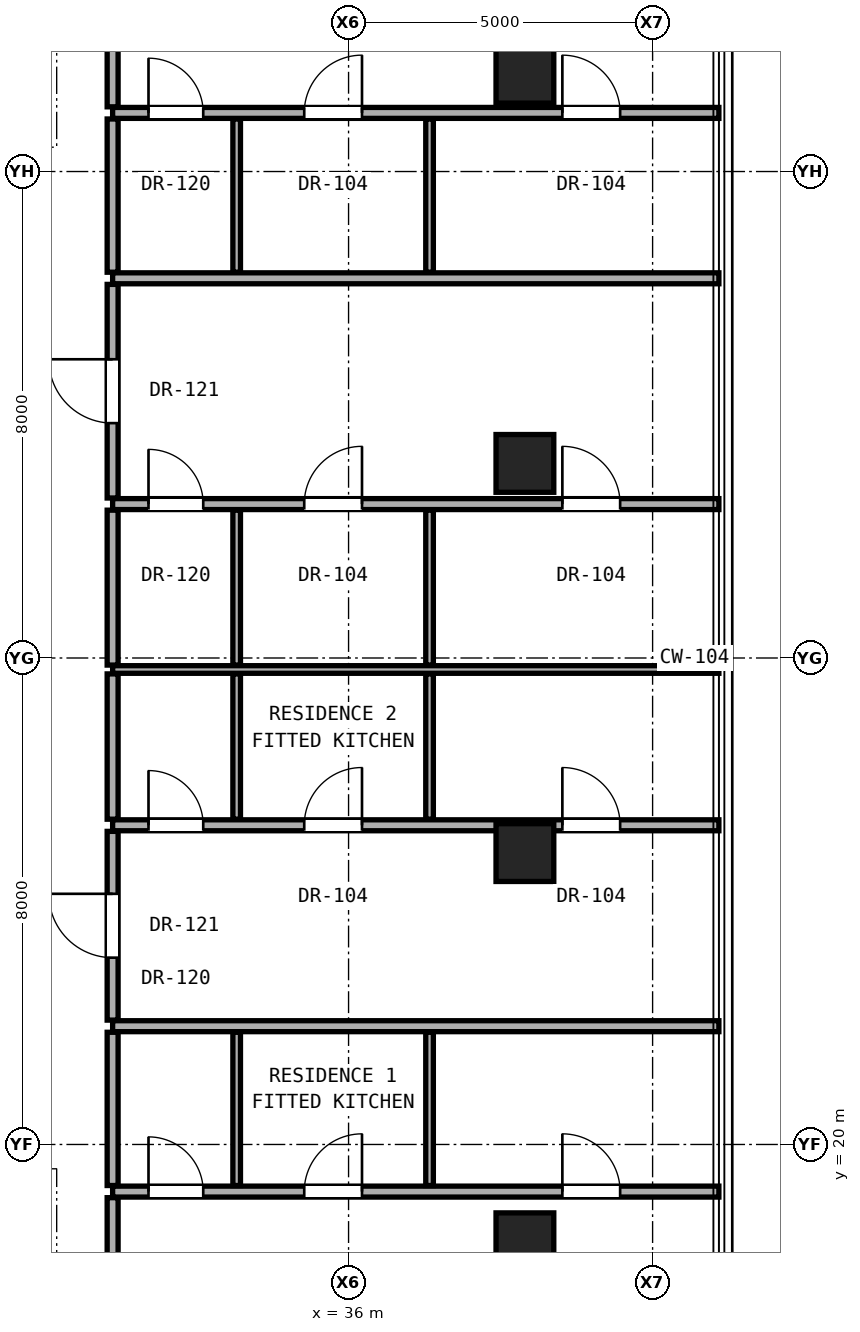
"""IFC4 building model, lengths in metres.
Left out: names, types, materials, properties, quantities, classifications, styles, units other than length and angle.
Written with IfcOpenShell. Run it as: python <this file> out.ifc"""

import sys

from ifc_helpers import new_model, si_unit, direction, frame, frame_2d, origin, origin_2d, place, context, subcontext, project, spatial, rectangle, hollow_rectangle, extrude, element, fill, save


model = new_model("IFC4")
c1 = context("Model", 3, precision=1e-05, world=origin(), true_north=direction((0.0, 1.0)))
c2 = subcontext(c1, "Body", "Model", "MODEL_VIEW")
j1 = project(units=[si_unit("LENGTHUNIT", "METRE"), si_unit("PLANEANGLEUNIT", "RADIAN")], contexts=[c1])
p1 = place(None, origin())
s1 = spatial("IfcSite", under=j1, at=p1, CompositionType="ELEMENT")
p2 = place(p1, origin())
s2 = spatial("IfcBuilding", under=s1, at=p2, CompositionType="ELEMENT")
p3 = place(p2, frame((0.0, 0.0, 177.15)))
s3 = spatial("IfcBuildingStorey", under=s2, at=p3, CompositionType="ELEMENT", Elevation=177.15)
for number, where, z_axis, x_axis in (
    (1, (38.9, 18.4, 0.0), (0.0, 0.0, 1.0), (1.0, 0.0, 0.0)),
    (2, (38.9, 24.8, 0.0), (0.0, 0.0, 1.0), (1.0, 0.0, 0.0)),
    (3, (38.9, 31.2, 0.0), (0.0, 0.0, 1.0), (1.0, 0.0, 0.0)),
    (4, (38.9, 37.6, 0.0), (0.0, 0.0, 1.0), (1.0, 0.0, 0.0)),
):
    element("IfcColumn", number, at=place(p3, frame(where, z_axis=z_axis, x_axis=x_axis)), inside=s3, PredefinedType="COLUMN", context=c2, shape_type="SweptSolid", body=[
        extrude(hollow_rectangle(XDim=0.95, YDim=0.95, WallThickness=0.05, at=origin_2d()), origin(), (0.0, 0.0, 1.0), 3.25),
    ])
p4 = place(p3, frame((32.12, 19.225, 0.0), z_axis=(0.0, 0.0, 1.0), x_axis=(1.0, 0.0, 0.0)))
e5 = element("IfcWall", 5, at=p4, inside=s3, PredefinedType="PARTITIONING", context=c2, shape_type="SweptSolid", body=[
    extrude(rectangle(XDim=9.97, YDim=0.18, at=frame_2d((4.985, 0.0))), origin(), (0.0, 0.0, 1.0), 2.269),
])
p5 = place(p4, frame((7.396, 0.0, 0.0)))
e6 = element("IfcOpeningElement", 6, at=p5, cuts=e5, PredefinedType="OPENING", context=c2, shape_type="SweptSolid", body=[
    extrude(rectangle(XDim=0.95, YDim=2.15, at=frame_2d((0.475, 1.075))), frame((0.0, 0.1, 0.0), z_axis=(0.0, -1.0, 0.0), x_axis=(1.0, 0.0, 0.0)), (0.0, 0.0, 1.0), 0.2),
])
p6 = place(p4, frame((3.151, 0.0, 0.0)))
e7 = element("IfcOpeningElement", 7, at=p6, cuts=e5, PredefinedType="OPENING", context=c2, shape_type="SweptSolid", body=[
    extrude(rectangle(XDim=0.95, YDim=2.15, at=frame_2d((0.475, 1.075))), frame((0.0, 0.1, 0.0), z_axis=(0.0, -1.0, 0.0), x_axis=(1.0, 0.0, 0.0)), (0.0, 0.0, 1.0), 0.2),
])
p7 = place(p4, frame((0.59, 0.0, 0.0)))
e8 = element("IfcOpeningElement", 8, at=p7, cuts=e5, PredefinedType="OPENING", context=c2, shape_type="SweptSolid", body=[
    extrude(rectangle(XDim=0.9, YDim=2.1, at=frame_2d((0.45, 1.05))), frame((0.0, 0.1, 0.0), z_axis=(0.0, -1.0, 0.0), x_axis=(1.0, 0.0, 0.0)), (0.0, 0.0, 1.0), 0.2),
])
p8 = place(p3, frame((32.12, 21.945, 0.0), z_axis=(0.0, 0.0, 1.0), x_axis=(1.0, 0.0, 0.0)))
e9 = element("IfcWall", 9, at=p8, inside=s3, PredefinedType="PARTITIONING", context=c2, shape_type="SweptSolid", body=[
    extrude(rectangle(XDim=9.97, YDim=0.18, at=frame_2d((4.985, 0.0))), origin(), (0.0, 0.0, 1.0), 2.269),
])
p9 = place(p3, frame((32.12, 25.249, 0.0), z_axis=(0.0, 0.0, 1.0), x_axis=(1.0, 0.0, 0.0)))
e10 = element("IfcWall", 10, at=p9, inside=s3, PredefinedType="PARTITIONING", context=c2, shape_type="SweptSolid", body=[
    extrude(rectangle(XDim=9.97, YDim=0.18, at=frame_2d((4.985, 0.0))), origin(), (0.0, 0.0, 1.0), 2.269),
])
p10 = place(p9, frame((7.396, 0.0, 0.0)))
e11 = element("IfcOpeningElement", 11, at=p10, cuts=e10, PredefinedType="OPENING", context=c2, shape_type="SweptSolid", body=[
    extrude(rectangle(XDim=0.95, YDim=2.15, at=frame_2d((0.475, 1.075))), frame((0.0, 0.1, 0.0), z_axis=(0.0, -1.0, 0.0), x_axis=(1.0, 0.0, 0.0)), (0.0, 0.0, 1.0), 0.2),
])
p11 = place(p9, frame((3.151, 0.0, 0.0)))
e12 = element("IfcOpeningElement", 12, at=p11, cuts=e10, PredefinedType="OPENING", context=c2, shape_type="SweptSolid", body=[
    extrude(rectangle(XDim=0.95, YDim=2.15, at=frame_2d((0.475, 1.075))), frame((0.0, 0.1, 0.0), z_axis=(0.0, -1.0, 0.0), x_axis=(1.0, 0.0, 0.0)), (0.0, 0.0, 1.0), 0.2),
])
p12 = place(p9, frame((0.59, 0.0, 0.0)))
e13 = element("IfcOpeningElement", 13, at=p12, cuts=e10, PredefinedType="OPENING", context=c2, shape_type="SweptSolid", body=[
    extrude(rectangle(XDim=0.9, YDim=2.1, at=frame_2d((0.45, 1.05))), frame((0.0, 0.1, 0.0), z_axis=(0.0, -1.0, 0.0), x_axis=(1.0, 0.0, 0.0)), (0.0, 0.0, 1.0), 0.2),
])
p13 = place(p3, frame((32.12, 27.811, 0.0), z_axis=(0.0, 0.0, 1.0), x_axis=(1.0, 0.0, 0.0)))
e14 = element("IfcWall", 14, at=p13, inside=s3, PredefinedType="PARTITIONING", context=c2, shape_type="SweptSolid", body=[
    extrude(rectangle(XDim=9.97, YDim=0.125, at=frame_2d((4.985, 0.0))), origin(), (0.0, 0.0, 1.0), 2.269),
])
p14 = place(p3, frame((32.12, 30.531, 0.0), z_axis=(0.0, 0.0, 1.0), x_axis=(1.0, 0.0, 0.0)))
e15 = element("IfcWall", 15, at=p14, inside=s3, PredefinedType="PARTITIONING", context=c2, shape_type="SweptSolid", body=[
    extrude(rectangle(XDim=9.97, YDim=0.18, at=frame_2d((4.985, 0.0))), origin(), (0.0, 0.0, 1.0), 2.269),
])
p15 = place(p14, frame((7.396, 0.0, 0.0)))
e16 = element("IfcOpeningElement", 16, at=p15, cuts=e15, PredefinedType="OPENING", context=c2, shape_type="SweptSolid", body=[
    extrude(rectangle(XDim=0.95, YDim=2.15, at=frame_2d((0.475, 1.075))), frame((0.0, 0.1, 0.0), z_axis=(0.0, -1.0, 0.0), x_axis=(1.0, 0.0, 0.0)), (0.0, 0.0, 1.0), 0.2),
])
p16 = place(p14, frame((3.151, 0.0, 0.0)))
e17 = element("IfcOpeningElement", 17, at=p16, cuts=e15, PredefinedType="OPENING", context=c2, shape_type="SweptSolid", body=[
    extrude(rectangle(XDim=0.95, YDim=2.15, at=frame_2d((0.475, 1.075))), frame((0.0, 0.1, 0.0), z_axis=(0.0, -1.0, 0.0), x_axis=(1.0, 0.0, 0.0)), (0.0, 0.0, 1.0), 0.2),
])
p17 = place(p14, frame((0.59, 0.0, 0.0)))
e18 = element("IfcOpeningElement", 18, at=p17, cuts=e15, PredefinedType="OPENING", context=c2, shape_type="SweptSolid", body=[
    extrude(rectangle(XDim=0.9, YDim=2.1, at=frame_2d((0.45, 1.05))), frame((0.0, 0.1, 0.0), z_axis=(0.0, -1.0, 0.0), x_axis=(1.0, 0.0, 0.0)), (0.0, 0.0, 1.0), 0.2),
])
p18 = place(p3, frame((32.12, 34.244, 0.0), z_axis=(0.0, 0.0, 1.0), x_axis=(1.0, 0.0, 0.0)))
e19 = element("IfcWall", 19, at=p18, inside=s3, PredefinedType="PARTITIONING", context=c2, shape_type="SweptSolid", body=[
    extrude(rectangle(XDim=9.97, YDim=0.18, at=frame_2d((4.985, 0.0))), origin(), (0.0, 0.0, 1.0), 2.269),
])
p19 = place(p3, frame((32.12, 36.964, 0.0), z_axis=(0.0, 0.0, 1.0), x_axis=(1.0, 0.0, 0.0)))
e20 = element("IfcWall", 20, at=p19, inside=s3, PredefinedType="PARTITIONING", context=c2, shape_type="SweptSolid", body=[
    extrude(rectangle(XDim=9.97, YDim=0.18, at=frame_2d((4.985, 0.0))), origin(), (0.0, 0.0, 1.0), 2.269),
])
p20 = place(p19, frame((7.396, 0.0, 0.0)))
e21 = element("IfcOpeningElement", 21, at=p20, cuts=e20, PredefinedType="OPENING", context=c2, shape_type="SweptSolid", body=[
    extrude(rectangle(XDim=0.95, YDim=2.15, at=frame_2d((0.475, 1.075))), frame((0.0, 0.1, 0.0), z_axis=(0.0, -1.0, 0.0), x_axis=(1.0, 0.0, 0.0)), (0.0, 0.0, 1.0), 0.2),
])
p21 = place(p19, frame((3.151, 0.0, 0.0)))
e22 = element("IfcOpeningElement", 22, at=p21, cuts=e20, PredefinedType="OPENING", context=c2, shape_type="SweptSolid", body=[
    extrude(rectangle(XDim=0.95, YDim=2.15, at=frame_2d((0.475, 1.075))), frame((0.0, 0.1, 0.0), z_axis=(0.0, -1.0, 0.0), x_axis=(1.0, 0.0, 0.0)), (0.0, 0.0, 1.0), 0.2),
])
p22 = place(p19, frame((0.59, 0.0, 0.0)))
e23 = element("IfcOpeningElement", 23, at=p22, cuts=e20, PredefinedType="OPENING", context=c2, shape_type="SweptSolid", body=[
    extrude(rectangle(XDim=0.9, YDim=2.1, at=frame_2d((0.45, 1.05))), frame((0.0, 0.1, 0.0), z_axis=(0.0, -1.0, 0.0), x_axis=(1.0, 0.0, 0.0)), (0.0, 0.0, 1.0), 0.2),
])
p23 = place(p3, frame((32.12, 14.489, 0.0), z_axis=(0.0, 0.0, 1.0), x_axis=(0.0, 1.0, 0.0)))
e24 = element("IfcWall", 24, at=p23, inside=s3, PredefinedType="PARTITIONING", context=c2, shape_type="SweptSolid", body=[
    extrude(rectangle(XDim=4.636, YDim=0.18, at=frame_2d((2.318, 0.0))), origin(), (0.0, 0.0, 1.0), 2.442),
])
p24 = place(p23, frame((2.093, 0.0, 0.0)))
e25 = element("IfcOpeningElement", 25, at=p24, cuts=e24, PredefinedType="OPENING", context=c2, shape_type="SweptSolid", body=[
    extrude(rectangle(XDim=1.05, YDim=2.2, at=frame_2d((0.525, 1.1))), frame((0.0, 0.1, 0.0), z_axis=(0.0, -1.0, 0.0), x_axis=(1.0, 0.0, 0.0)), (0.0, 0.0, 1.0), 0.2),
])
p25 = place(p3, frame((32.12, 19.325, 0.0), z_axis=(0.0, 0.0, 1.0), x_axis=(0.0, 1.0, 0.0)))
e26 = element("IfcWall", 26, at=p25, inside=s3, PredefinedType="PARTITIONING", context=c2, shape_type="SweptSolid", body=[
    extrude(rectangle(XDim=2.52, YDim=0.18, at=frame_2d((1.26, 0.0))), origin(), (0.0, 0.0, 1.0), 3.05),
])
p26 = place(p3, frame((32.12, 22.045, 0.0), z_axis=(0.0, 0.0, 1.0), x_axis=(0.0, 1.0, 0.0)))
e27 = element("IfcWall", 27, at=p26, inside=s3, PredefinedType="PARTITIONING", context=c2, shape_type="SweptSolid", body=[
    extrude(rectangle(XDim=3.104, YDim=0.18, at=frame_2d((1.552, 0.0))), origin(), (0.0, 0.0, 1.0), 2.346),
])
p27 = place(p26, frame((1.027, 0.0, 0.0)))
e28 = element("IfcOpeningElement", 28, at=p27, cuts=e27, PredefinedType="OPENING", context=c2, shape_type="SweptSolid", body=[
    extrude(rectangle(XDim=1.05, YDim=2.2, at=frame_2d((0.525, 1.1))), frame((0.0, 0.1, 0.0), z_axis=(0.0, -1.0, 0.0), x_axis=(1.0, 0.0, 0.0)), (0.0, 0.0, 1.0), 0.2),
])
p28 = place(p3, frame((32.12, 25.349, 0.0), z_axis=(0.0, 0.0, 1.0), x_axis=(0.0, 1.0, 0.0)))
e29 = element("IfcWall", 29, at=p28, inside=s3, PredefinedType="PARTITIONING", context=c2, shape_type="SweptSolid", body=[
    extrude(rectangle(XDim=2.389, YDim=0.18, at=frame_2d((1.195, 0.0))), origin(), (0.0, 0.0, 1.0), 3.05),
])
p29 = place(p3, frame((32.12, 27.884, 0.0), z_axis=(0.0, 0.0, 1.0), x_axis=(0.0, 1.0, 0.0)))
e30 = element("IfcWall", 30, at=p29, inside=s3, PredefinedType="PARTITIONING", context=c2, shape_type="SweptSolid", body=[
    extrude(rectangle(XDim=2.547, YDim=0.18, at=frame_2d((1.274, 0.0))), origin(), (0.0, 0.0, 1.0), 3.05),
])
p30 = place(p3, frame((32.12, 30.631, 0.0), z_axis=(0.0, 0.0, 1.0), x_axis=(0.0, 1.0, 0.0)))
e31 = element("IfcWall", 31, at=p30, inside=s3, PredefinedType="PARTITIONING", context=c2, shape_type="SweptSolid", body=[
    extrude(rectangle(XDim=3.513, YDim=0.18, at=frame_2d((1.756, 0.0))), origin(), (0.0, 0.0, 1.0), 2.346),
])
p31 = place(p30, frame((1.231, 0.0, 0.0)))
e32 = element("IfcOpeningElement", 32, at=p31, cuts=e31, PredefinedType="OPENING", context=c2, shape_type="SweptSolid", body=[
    extrude(rectangle(XDim=1.05, YDim=2.2, at=frame_2d((0.525, 1.1))), frame((0.0, 0.1, 0.0), z_axis=(0.0, -1.0, 0.0), x_axis=(1.0, 0.0, 0.0)), (0.0, 0.0, 1.0), 0.2),
])
p32 = place(p3, frame((32.12, 34.344, 0.0), z_axis=(0.0, 0.0, 1.0), x_axis=(0.0, 1.0, 0.0)))
e33 = element("IfcWall", 33, at=p32, inside=s3, PredefinedType="PARTITIONING", context=c2, shape_type="SweptSolid", body=[
    extrude(rectangle(XDim=2.52, YDim=0.18, at=frame_2d((1.26, 0.0))), origin(), (0.0, 0.0, 1.0), 3.05),
])
p33 = place(p3, frame((32.12, 37.064, 0.0), z_axis=(0.0, 0.0, 1.0), x_axis=(0.0, 1.0, 0.0)))
e34 = element("IfcWall", 34, at=p33, inside=s3, PredefinedType="PARTITIONING", context=c2, shape_type="SweptSolid", body=[
    extrude(rectangle(XDim=4.447, YDim=0.18, at=frame_2d((2.224, 0.0))), origin(), (0.0, 0.0, 1.0), 2.442),
])
p34 = place(p33, frame((1.098, 0.0, 0.0)))
e35 = element("IfcOpeningElement", 35, at=p34, cuts=e34, PredefinedType="OPENING", context=c2, shape_type="SweptSolid", body=[
    extrude(rectangle(XDim=1.05, YDim=2.2, at=frame_2d((0.525, 1.1))), frame((0.0, 0.1, 0.0), z_axis=(0.0, -1.0, 0.0), x_axis=(1.0, 0.0, 0.0)), (0.0, 0.0, 1.0), 0.2),
])
p35 = place(p3, frame((34.16, 19.325, 0.0), z_axis=(0.0, 0.0, 1.0), x_axis=(0.0, 1.0, 0.0)))
e36 = element("IfcWall", 36, at=p35, inside=s3, PredefinedType="PARTITIONING", context=c2, shape_type="SweptSolid", body=[
    extrude(rectangle(XDim=2.52, YDim=0.125, at=frame_2d((1.26, 0.0))), origin(), (0.0, 0.0, 1.0), 3.05),
])
p36 = place(p3, frame((34.16, 25.349, 0.0), z_axis=(0.0, 0.0, 1.0), x_axis=(0.0, 1.0, 0.0)))
e37 = element("IfcWall", 37, at=p36, inside=s3, PredefinedType="PARTITIONING", context=c2, shape_type="SweptSolid", body=[
    extrude(rectangle(XDim=2.389, YDim=0.125, at=frame_2d((1.195, 0.0))), origin(), (0.0, 0.0, 1.0), 3.05),
])
p37 = place(p3, frame((34.16, 27.884, 0.0), z_axis=(0.0, 0.0, 1.0), x_axis=(0.0, 1.0, 0.0)))
e38 = element("IfcWall", 38, at=p37, inside=s3, PredefinedType="PARTITIONING", context=c2, shape_type="SweptSolid", body=[
    extrude(rectangle(XDim=2.547, YDim=0.125, at=frame_2d((1.274, 0.0))), origin(), (0.0, 0.0, 1.0), 3.05),
])
for number, where, z_axis, x_axis in (
    (39, (34.16, 34.344, 0.0), (0.0, 0.0, 1.0), (0.0, 1.0, 0.0)),
    (40, (37.332, 19.325, 0.0), (0.0, 0.0, 1.0), (0.0, 1.0, 0.0)),
):
    element("IfcWall", number, at=place(p3, frame(where, z_axis=z_axis, x_axis=x_axis)), inside=s3, PredefinedType="PARTITIONING", context=c2, shape_type="SweptSolid", body=[
        extrude(rectangle(XDim=2.52, YDim=0.125, at=frame_2d((1.26, 0.0))), origin(), (0.0, 0.0, 1.0), 3.05),
    ])
p38 = place(p3, frame((37.332, 25.349, 0.0), z_axis=(0.0, 0.0, 1.0), x_axis=(0.0, 1.0, 0.0)))
e41 = element("IfcWall", 41, at=p38, inside=s3, PredefinedType="PARTITIONING", context=c2, shape_type="SweptSolid", body=[
    extrude(rectangle(XDim=2.389, YDim=0.125, at=frame_2d((1.195, 0.0))), origin(), (0.0, 0.0, 1.0), 3.05),
])
p39 = place(p3, frame((37.332, 27.884, 0.0), z_axis=(0.0, 0.0, 1.0), x_axis=(0.0, 1.0, 0.0)))
e42 = element("IfcWall", 42, at=p39, inside=s3, PredefinedType="PARTITIONING", context=c2, shape_type="SweptSolid", body=[
    extrude(rectangle(XDim=2.547, YDim=0.125, at=frame_2d((1.274, 0.0))), origin(), (0.0, 0.0, 1.0), 3.05),
])
p40 = place(p3, frame((37.332, 34.344, 0.0), z_axis=(0.0, 0.0, 1.0), x_axis=(0.0, 1.0, 0.0)))
e43 = element("IfcWall", 43, at=p40, inside=s3, PredefinedType="PARTITIONING", context=c2, shape_type="SweptSolid", body=[
    extrude(rectangle(XDim=2.52, YDim=0.125, at=frame_2d((1.26, 0.0))), origin(), (0.0, 0.0, 1.0), 3.05),
])
p41 = place(p5, origin())
e44 = element("IfcDoor", 44, at=p41, inside=s3, OperationType="SINGLE_SWING_LEFT", PredefinedType="DOOR", context=c2, shape_type="SweptSolid", body=[
    extrude(rectangle(XDim=0.95, YDim=2.15, at=frame_2d((0.475, 1.075))), frame((0.0, 0.025, 0.0), z_axis=(0.0, -1.0, 0.0), x_axis=(1.0, 0.0, 0.0)), (0.0, 0.0, 1.0), 0.05),
])
fill(e6, e44)
p42 = place(p6, origin())
e45 = element("IfcDoor", 45, at=p42, inside=s3, OperationType="SINGLE_SWING_RIGHT", PredefinedType="DOOR", context=c2, shape_type="SweptSolid", body=[
    extrude(rectangle(XDim=0.95, YDim=2.15, at=frame_2d((0.475, 1.075))), frame((0.0, 0.025, 0.0), z_axis=(0.0, -1.0, 0.0), x_axis=(1.0, 0.0, 0.0)), (0.0, 0.0, 1.0), 0.05),
])
fill(e7, e45)
p43 = place(p7, origin())
e46 = element("IfcDoor", 46, at=p43, inside=s3, OperationType="SINGLE_SWING_LEFT", PredefinedType="DOOR", context=c2, shape_type="SweptSolid", body=[
    extrude(rectangle(XDim=0.9, YDim=2.1, at=frame_2d((0.45, 1.05))), frame((0.0, 0.025, 0.0), z_axis=(0.0, -1.0, 0.0), x_axis=(1.0, 0.0, 0.0)), (0.0, 0.0, 1.0), 0.05),
])
fill(e8, e46)
p44 = place(p27, origin())
e47 = element("IfcDoor", 47, at=p44, inside=s3, OperationType="SINGLE_SWING_RIGHT", PredefinedType="DOOR", context=c2, shape_type="SweptSolid", body=[
    extrude(rectangle(XDim=1.05, YDim=2.2, at=frame_2d((0.525, 1.1))), frame((0.0, 0.025, 0.0), z_axis=(0.0, -1.0, 0.0), x_axis=(1.0, 0.0, 0.0)), (0.0, 0.0, 1.0), 0.05),
])
fill(e28, e47)
p45 = place(p10, origin())
e48 = element("IfcDoor", 48, at=p45, inside=s3, OperationType="SINGLE_SWING_LEFT", PredefinedType="DOOR", context=c2, shape_type="SweptSolid", body=[
    extrude(rectangle(XDim=0.95, YDim=2.15, at=frame_2d((0.475, 1.075))), frame((0.0, 0.025, 0.0), z_axis=(0.0, -1.0, 0.0), x_axis=(1.0, 0.0, 0.0)), (0.0, 0.0, 1.0), 0.05),
])
fill(e11, e48)
p46 = place(p11, origin())
e49 = element("IfcDoor", 49, at=p46, inside=s3, OperationType="SINGLE_SWING_RIGHT", PredefinedType="DOOR", context=c2, shape_type="SweptSolid", body=[
    extrude(rectangle(XDim=0.95, YDim=2.15, at=frame_2d((0.475, 1.075))), frame((0.0, 0.025, 0.0), z_axis=(0.0, -1.0, 0.0), x_axis=(1.0, 0.0, 0.0)), (0.0, 0.0, 1.0), 0.05),
])
fill(e12, e49)
p47 = place(p12, origin())
e50 = element("IfcDoor", 50, at=p47, inside=s3, OperationType="SINGLE_SWING_LEFT", PredefinedType="DOOR", context=c2, shape_type="SweptSolid", body=[
    extrude(rectangle(XDim=0.9, YDim=2.1, at=frame_2d((0.45, 1.05))), frame((0.0, 0.025, 0.0), z_axis=(0.0, -1.0, 0.0), x_axis=(1.0, 0.0, 0.0)), (0.0, 0.0, 1.0), 0.05),
])
fill(e13, e50)
p48 = place(p31, origin())
e51 = element("IfcDoor", 51, at=p48, inside=s3, OperationType="SINGLE_SWING_RIGHT", PredefinedType="DOOR", context=c2, shape_type="SweptSolid", body=[
    extrude(rectangle(XDim=1.05, YDim=2.2, at=frame_2d((0.525, 1.1))), frame((0.0, 0.025, 0.0), z_axis=(0.0, -1.0, 0.0), x_axis=(1.0, 0.0, 0.0)), (0.0, 0.0, 1.0), 0.05),
])
fill(e32, e51)
p49 = place(p15, origin())
e52 = element("IfcDoor", 52, at=p49, inside=s3, OperationType="SINGLE_SWING_LEFT", PredefinedType="DOOR", context=c2, shape_type="SweptSolid", body=[
    extrude(rectangle(XDim=0.95, YDim=2.15, at=frame_2d((0.475, 1.075))), frame((0.0, 0.025, 0.0), z_axis=(0.0, -1.0, 0.0), x_axis=(1.0, 0.0, 0.0)), (0.0, 0.0, 1.0), 0.05),
])
fill(e16, e52)
p50 = place(p16, origin())
e53 = element("IfcDoor", 53, at=p50, inside=s3, OperationType="SINGLE_SWING_RIGHT", PredefinedType="DOOR", context=c2, shape_type="SweptSolid", body=[
    extrude(rectangle(XDim=0.95, YDim=2.15, at=frame_2d((0.475, 1.075))), frame((0.0, 0.025, 0.0), z_axis=(0.0, -1.0, 0.0), x_axis=(1.0, 0.0, 0.0)), (0.0, 0.0, 1.0), 0.05),
])
fill(e17, e53)
p51 = place(p17, origin())
e54 = element("IfcDoor", 54, at=p51, inside=s3, OperationType="SINGLE_SWING_LEFT", PredefinedType="DOOR", context=c2, shape_type="SweptSolid", body=[
    extrude(rectangle(XDim=0.9, YDim=2.1, at=frame_2d((0.45, 1.05))), frame((0.0, 0.025, 0.0), z_axis=(0.0, -1.0, 0.0), x_axis=(1.0, 0.0, 0.0)), (0.0, 0.0, 1.0), 0.05),
])
fill(e18, e54)
p52 = place(p20, origin())
e55 = element("IfcDoor", 55, at=p52, inside=s3, OperationType="SINGLE_SWING_LEFT", PredefinedType="DOOR", context=c2, shape_type="SweptSolid", body=[
    extrude(rectangle(XDim=0.95, YDim=2.15, at=frame_2d((0.475, 1.075))), frame((0.0, 0.025, 0.0), z_axis=(0.0, -1.0, 0.0), x_axis=(1.0, 0.0, 0.0)), (0.0, 0.0, 1.0), 0.05),
])
fill(e21, e55)
p53 = place(p21, origin())
e56 = element("IfcDoor", 56, at=p53, inside=s3, OperationType="SINGLE_SWING_RIGHT", PredefinedType="DOOR", context=c2, shape_type="SweptSolid", body=[
    extrude(rectangle(XDim=0.95, YDim=2.15, at=frame_2d((0.475, 1.075))), frame((0.0, 0.025, 0.0), z_axis=(0.0, -1.0, 0.0), x_axis=(1.0, 0.0, 0.0)), (0.0, 0.0, 1.0), 0.05),
])
fill(e22, e56)
p54 = place(p22, origin())
e57 = element("IfcDoor", 57, at=p54, inside=s3, OperationType="SINGLE_SWING_LEFT", PredefinedType="DOOR", context=c2, shape_type="SweptSolid", body=[
    extrude(rectangle(XDim=0.9, YDim=2.1, at=frame_2d((0.45, 1.05))), frame((0.0, 0.025, 0.0), z_axis=(0.0, -1.0, 0.0), x_axis=(1.0, 0.0, 0.0)), (0.0, 0.0, 1.0), 0.05),
])
fill(e23, e57)
save(model, sys.argv[1])
